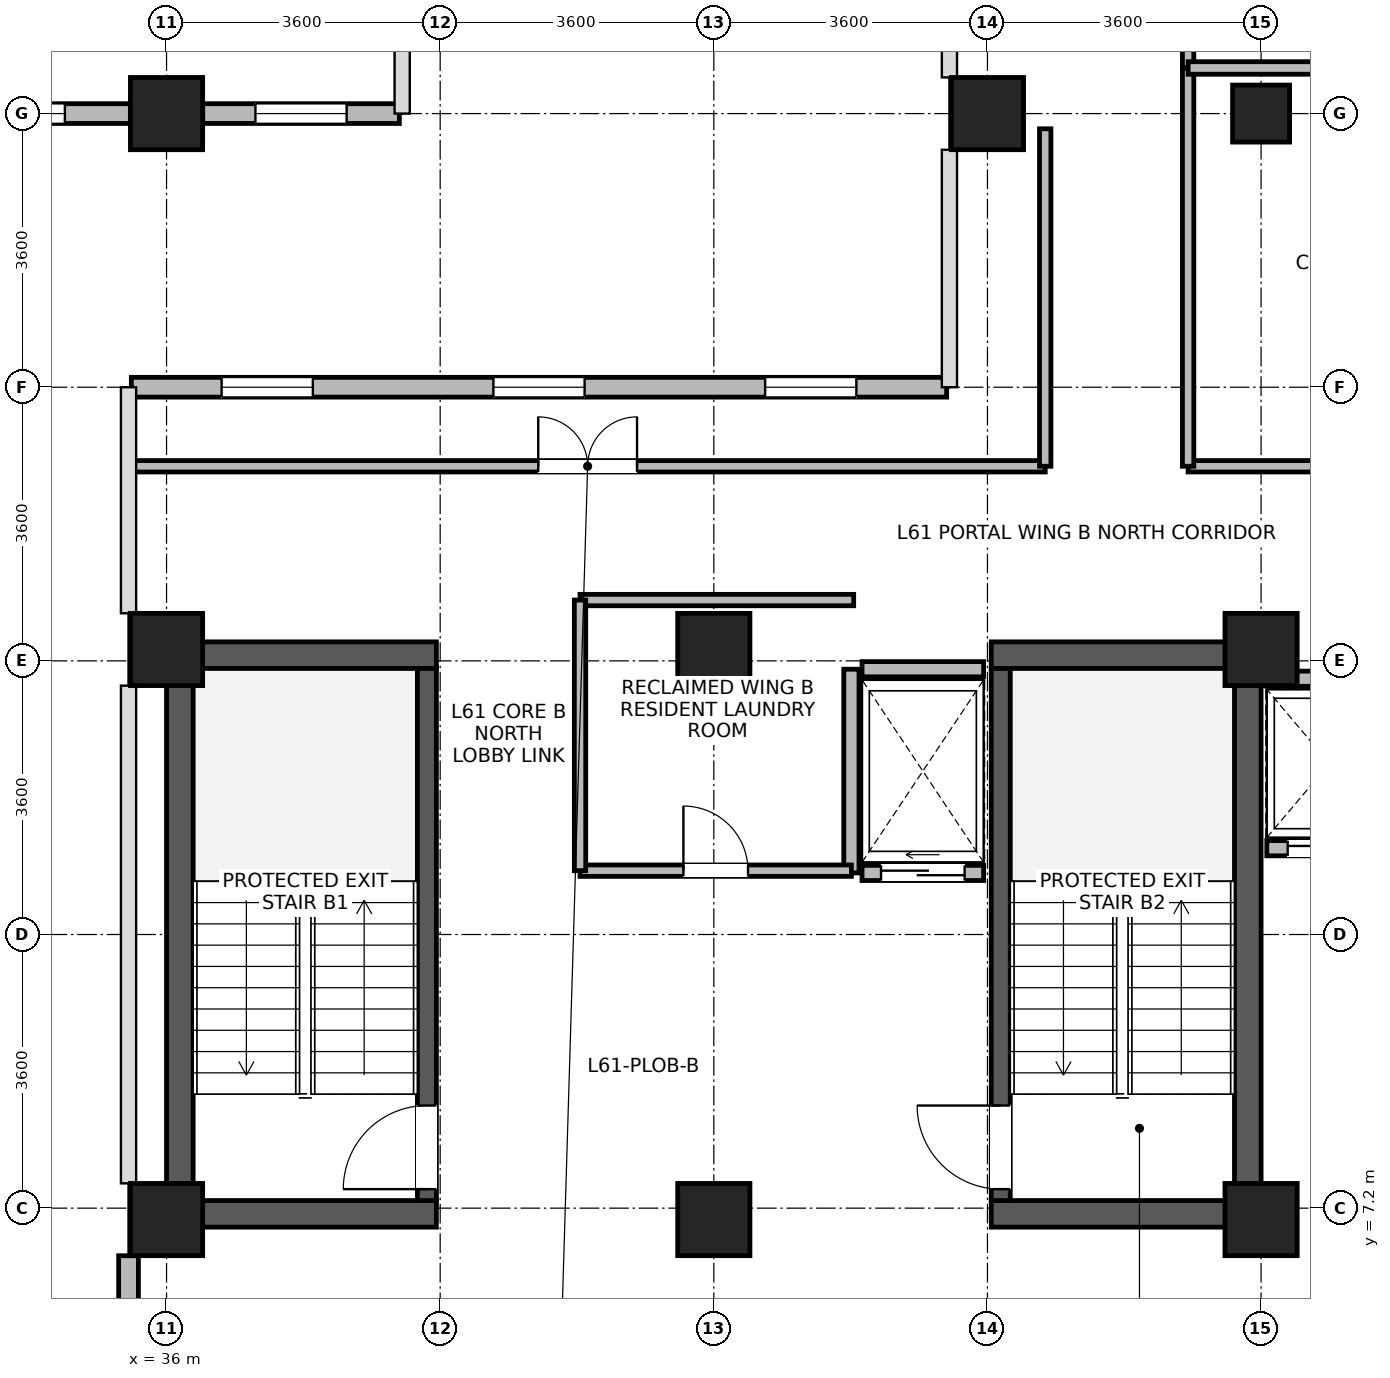
"""IFC4 building model, lengths in metres.
Left out: names, types, materials, properties, quantities, classifications, styles, units other than length and angle.
Written with IfcOpenShell. Run it as: python <this file> out.ifc"""

import sys

from ifc_helpers import new_model, si_unit, direction, frame, frame_2d, origin, origin_2d, place, context, subcontext, project, spatial, rectangle, extrude, source, transform, mapped, element, fill, save


model = new_model("IFC4")
c1 = context("Model", 3, precision=1e-05, world=origin(), true_north=direction((0.0, 1.0)))
c2 = subcontext(c1, "Body", "Model", "MODEL_VIEW")
j1 = project(units=[si_unit("LENGTHUNIT", "METRE"), si_unit("PLANEANGLEUNIT", "RADIAN")], contexts=[c1])
p1 = place(None, origin())
s1 = spatial("IfcSite", under=j1, at=p1, CompositionType="ELEMENT")
p2 = place(p1, origin())
s2 = spatial("IfcBuilding", under=s1, at=p2, CompositionType="ELEMENT")
p3 = place(p2, frame((0.0, 0.0, 238.8)))
s3 = spatial("IfcBuildingStorey", under=s2, at=p3, CompositionType="ELEMENT", Elevation=238.8)
for number, where, z_axis, x_axis in (
    (1, (36.175, 6.95, 0.0), (0.0, 0.0, 1.0), (0.0, 1.0, 0.0)),
    (2, (50.225, 6.95, 0.0), (0.0, 0.0, 1.0), (0.0, 1.0, 0.0)),
):
    element("IfcWall", number, at=place(p3, frame(where, z_axis=z_axis, x_axis=x_axis)), inside=s3, PredefinedType="SHEAR", context=c2, shape_type="SweptSolid", body=[
        extrude(rectangle(XDim=7.7, YDim=0.35, at=frame_2d((3.85, 0.0))), origin(), (0.0, 0.0, 1.0), 3.44),
    ])
for number, where, z_axis, x_axis in (
    (3, (36.35, 7.125, 0.0), (0.0, 0.0, 1.0), (1.0, 0.0, 0.0)),
    (4, (46.85, 7.125, 0.0), (0.0, 0.0, 1.0), (1.0, 0.0, 0.0)),
    (5, (36.35, 14.475, 0.0), (0.0, 0.0, 1.0), (1.0, 0.0, 0.0)),
    (6, (46.85, 14.475, 0.0), (0.0, 0.0, 1.0), (1.0, 0.0, 0.0)),
):
    element("IfcWall", number, at=place(p3, frame(where, z_axis=z_axis, x_axis=x_axis)), inside=s3, PredefinedType="SHEAR", context=c2, shape_type="SweptSolid", body=[
        extrude(rectangle(XDim=3.2, YDim=0.35, at=frame_2d((1.6, 0.0))), origin(), (0.0, 0.0, 1.0), 3.44),
    ])
p4 = place(p3, frame((39.425, 7.3, 0.0), z_axis=(0.0, 0.0, 1.0), x_axis=(0.0, 1.0, 0.0)))
e7 = element("IfcWall", 7, at=p4, inside=s3, PredefinedType="SHEAR", context=c2, shape_type="SweptSolid", body=[
    extrude(rectangle(XDim=7.0, YDim=0.25, at=frame_2d((3.5, 0.0))), origin(), (0.0, 0.0, 1.0), 3.44),
])
p5 = place(p4, frame((0.15, 0.0, 0.0)))
e8 = element("IfcOpeningElement", 8, at=p5, cuts=e7, PredefinedType="OPENING", context=c2, shape_type="SweptSolid", body=[
    extrude(rectangle(XDim=1.1, YDim=2.08, at=frame_2d((0.55, 1.04))), frame((0.0, 0.135, 0.0), z_axis=(0.0, -1.0, 0.0), x_axis=(1.0, 0.0, 0.0)), (0.0, 0.0, 1.0), 0.27),
])
p6 = place(p3, frame((46.975, 7.3, 0.0), z_axis=(0.0, 0.0, 1.0), x_axis=(0.0, 1.0, 0.0)))
e9 = element("IfcWall", 9, at=p6, inside=s3, PredefinedType="SHEAR", context=c2, shape_type="SweptSolid", body=[
    extrude(rectangle(XDim=7.0, YDim=0.25, at=frame_2d((3.5, 0.0))), origin(), (0.0, 0.0, 1.0), 3.44),
])
p7 = place(p6, frame((0.15, 0.0, 0.0)))
e10 = element("IfcOpeningElement", 10, at=p7, cuts=e9, PredefinedType="OPENING", context=c2, shape_type="SweptSolid", body=[
    extrude(rectangle(XDim=1.1, YDim=2.08, at=frame_2d((0.55, 1.04))), frame((0.0, 0.135, 0.0), z_axis=(0.0, -1.0, 0.0), x_axis=(1.0, 0.0, 0.0)), (0.0, 0.0, 1.0), 0.27),
])
m1 = source(origin(), c2, "Body", "SweptSolid", [
    extrude(rectangle(XDim=0.95, YDim=0.95, at=origin_2d()), origin(), (0.0, 0.0, 1.0), 3.7),
])
for number, where, z_axis, x_axis in (
    (11, (36.0, 21.6, 0.0), (0.0, 0.0, 1.0), (1.0, 0.0, 0.0)),
    (12, (46.8, 21.6, 0.0), (0.0, 0.0, 1.0), (1.0, 0.0, 0.0)),
    (13, (36.0, 7.05, 0.0), (0.0, 0.0, 1.0), (1.0, 0.0, 0.0)),
    (14, (36.0, 14.55, 0.0), (0.0, 0.0, 1.0), (1.0, 0.0, 0.0)),
    (15, (43.2, 7.05, 0.0), (0.0, 0.0, 1.0), (1.0, 0.0, 0.0)),
    (16, (43.2, 14.55, 0.0), (0.0, 0.0, 1.0), (1.0, 0.0, 0.0)),
    (17, (50.4, 7.05, 0.0), (0.0, 0.0, 1.0), (1.0, 0.0, 0.0)),
    (18, (50.4, 14.55, 0.0), (0.0, 0.0, 1.0), (1.0, 0.0, 0.0)),
):
    element("IfcColumn", number, at=place(p3, frame(where, z_axis=z_axis, x_axis=x_axis)), inside=s3, PredefinedType="COLUMN", context=c2, shape_type="MappedRepresentation", body=[
        mapped(m1, transform((0.0, 0.0, 0.0), x_axis=(1.0, 0.0, 0.0), y_axis=(0.0, 1.0, 0.0), z_axis=(0.0, 0.0, 1.0), scale=1.0)),
    ])
m2 = source(origin(), c2, "Body", "SweptSolid", [
    extrude(rectangle(XDim=0.75, YDim=0.75, at=origin_2d()), origin(), (0.0, 0.0, 1.0), 3.7),
])
p8 = place(p3, frame((50.4, 21.6, 0.0), z_axis=(0.0, 0.0, 1.0), x_axis=(1.0, 0.0, 0.0)))
e19 = element("IfcColumn", 19, at=p8, inside=s3, PredefinedType="PILASTER", context=c2, shape_type="MappedRepresentation", body=[
    mapped(m2, transform((0.0, 0.0, 0.0), x_axis=(1.0, 0.0, 0.0), y_axis=(0.0, 1.0, 0.0), z_axis=(0.0, 0.0, 1.0), scale=1.0)),
])
p9 = place(p3, frame((35.524, 21.6, 0.0), z_axis=(0.0, 0.0, 1.0), x_axis=(-1.0, 0.0, 0.0)))
e20 = element("IfcWall", 20, at=p9, inside=s3, PredefinedType="STANDARD", context=c2, shape_type="SweptSolid", body=[
    extrude(rectangle(XDim=2.923, YDim=0.26, at=frame_2d((1.462, 0.0))), origin(), (0.0, 0.0, 1.0), 3.02),
])
p10 = place(p9, frame((0.862, 0.0, 0.85)))
e21 = element("IfcOpeningElement", 21, at=p10, cuts=e20, PredefinedType="OPENING", context=c2, shape_type="SweptSolid", body=[
    extrude(rectangle(XDim=1.2, YDim=1.75, at=frame_2d((0.6, 0.875))), frame((0.0, 0.14, 0.0), z_axis=(0.0, -1.0, 0.0), x_axis=(1.0, 0.0, 0.0)), (0.0, 0.0, 1.0), 0.28),
])
p11 = place(p3, frame((39.063, 21.6, 0.0), z_axis=(0.0, 0.0, 1.0), x_axis=(-1.0, 0.0, 0.0)))
e22 = element("IfcWall", 22, at=p11, inside=s3, PredefinedType="STANDARD", context=c2, shape_type="SweptSolid", body=[
    extrude(rectangle(XDim=2.587, YDim=0.26, at=frame_2d((1.293, 0.0))), origin(), (0.0, 0.0, 1.0), 3.42),
])
p12 = place(p11, frame((0.694, 0.0, 0.85)))
e23 = element("IfcOpeningElement", 23, at=p12, cuts=e22, PredefinedType="OPENING", context=c2, shape_type="SweptSolid", body=[
    extrude(rectangle(XDim=1.2, YDim=1.75, at=frame_2d((0.6, 0.875))), frame((0.0, 0.14, 0.0), z_axis=(0.0, -1.0, 0.0), x_axis=(1.0, 0.0, 0.0)), (0.0, 0.0, 1.0), 0.28),
])
p13 = place(p3, frame((35.537, 18.0, 0.0), z_axis=(0.0, 0.0, 1.0), x_axis=(1.0, 0.0, 0.0)))
e24 = element("IfcWall", 24, at=p13, inside=s3, PredefinedType="STANDARD", context=c2, shape_type="SweptSolid", body=[
    extrude(rectangle(XDim=10.726, YDim=0.26, at=frame_2d((5.363, 0.0))), origin(), (0.0, 0.0, 1.0), 3.42),
])
p14 = place(p13, frame((1.188, 0.0, 0.85)))
e25 = element("IfcOpeningElement", 25, at=p14, cuts=e24, PredefinedType="OPENING", context=c2, shape_type="SweptSolid", body=[
    extrude(rectangle(XDim=1.2, YDim=1.75, at=frame_2d((0.6, 0.875))), frame((0.0, 0.14, 0.0), z_axis=(0.0, -1.0, 0.0), x_axis=(1.0, 0.0, 0.0)), (0.0, 0.0, 1.0), 0.28),
])
p15 = place(p13, frame((4.763, 0.0, 0.85)))
e26 = element("IfcOpeningElement", 26, at=p15, cuts=e24, PredefinedType="OPENING", context=c2, shape_type="SweptSolid", body=[
    extrude(rectangle(XDim=1.2, YDim=1.75, at=frame_2d((0.6, 0.875))), frame((0.0, 0.14, 0.0), z_axis=(0.0, -1.0, 0.0), x_axis=(1.0, 0.0, 0.0)), (0.0, 0.0, 1.0), 0.28),
])
p16 = place(p13, frame((8.338, 0.0, 0.85)))
e27 = element("IfcOpeningElement", 27, at=p16, cuts=e24, PredefinedType="OPENING", context=c2, shape_type="SweptSolid", body=[
    extrude(rectangle(XDim=1.2, YDim=1.75, at=frame_2d((0.6, 0.875))), frame((0.0, 0.14, 0.0), z_axis=(0.0, -1.0, 0.0), x_axis=(1.0, 0.0, 0.0)), (0.0, 0.0, 1.0), 0.28),
])
p17 = place(p3, frame((35.5, 5.8, 0.0), z_axis=(0.0, 0.0, 1.0), x_axis=(0.0, 1.0, 0.0)))
e28 = element("IfcWall", 28, at=p17, inside=s3, PredefinedType="STANDARD", context=c2, shape_type="SweptSolid", body=[
    extrude(rectangle(XDim=0.774, YDim=0.26, at=frame_2d((0.387, 0.0))), origin(), (0.0, 0.0, 1.0), 3.44),
])
p18 = place(p3, frame((50.475, 11.935, 0.0), z_axis=(0.0, 0.0, 1.0), x_axis=(1.0, 0.0, 0.0)))
e29 = element("IfcWall", 29, at=p18, inside=s3, PredefinedType="PARTITIONING", context=c2, shape_type="SweptSolid", body=[
    extrude(rectangle(XDim=1.65, YDim=0.2, at=frame_2d((0.825, 0.0))), origin(), (0.0, 0.0, 1.0), 3.42),
])
p19 = place(p18, frame((0.275, 0.0, 0.0)))
e30 = element("IfcOpeningElement", 30, at=p19, cuts=e29, PredefinedType="OPENING", context=c2, shape_type="SweptSolid", body=[
    extrude(rectangle(XDim=1.1, YDim=2.12, at=frame_2d((0.55, 1.06))), frame((0.0, 0.11, 0.0), z_axis=(0.0, -1.0, 0.0), x_axis=(1.0, 0.0, 0.0)), (0.0, 0.0, 1.0), 0.22),
])
p20 = place(p3, frame((50.475, 14.165, 0.0), z_axis=(0.0, 0.0, 1.0), x_axis=(1.0, 0.0, 0.0)))
e31 = element("IfcWall", 31, at=p20, inside=s3, PredefinedType="PARTITIONING", context=c2, shape_type="SweptSolid", body=[
    extrude(rectangle(XDim=1.65, YDim=0.2, at=frame_2d((0.825, 0.0))), origin(), (0.0, 0.0, 1.0), 3.42),
])
p21 = place(p3, frame((45.15, 11.61, 0.0), z_axis=(0.0, 0.0, 1.0), x_axis=(1.0, 0.0, 0.0)))
e32 = element("IfcWall", 32, at=p21, inside=s3, PredefinedType="PARTITIONING", context=c2, shape_type="SweptSolid", body=[
    extrude(rectangle(XDim=1.6, YDim=0.2, at=frame_2d((0.8, 0.0))), origin(), (0.0, 0.0, 1.0), 3.42),
])
p22 = place(p21, frame((0.25, 0.0, 0.0)))
e33 = element("IfcOpeningElement", 33, at=p22, cuts=e32, PredefinedType="OPENING", context=c2, shape_type="SweptSolid", body=[
    extrude(rectangle(XDim=1.1, YDim=2.12, at=frame_2d((0.55, 1.06))), frame((0.0, 0.11, 0.0), z_axis=(0.0, -1.0, 0.0), x_axis=(1.0, 0.0, 0.0)), (0.0, 0.0, 1.0), 0.22),
])
p23 = place(p3, frame((45.15, 14.29, 0.0), z_axis=(0.0, 0.0, 1.0), x_axis=(1.0, 0.0, 0.0)))
e34 = element("IfcWall", 34, at=p23, inside=s3, PredefinedType="PARTITIONING", context=c2, shape_type="SweptSolid", body=[
    extrude(rectangle(XDim=1.6, YDim=0.2, at=frame_2d((0.8, 0.0))), origin(), (0.0, 0.0, 1.0), 2.52),
])
p24 = place(p3, frame((45.01, 11.61, 0.0), z_axis=(0.0, 0.0, 1.0), x_axis=(0.0, 1.0, 0.0)))
e35 = element("IfcWall", 35, at=p24, inside=s3, PredefinedType="PARTITIONING", context=c2, shape_type="SweptSolid", body=[
    extrude(rectangle(XDim=2.68, YDim=0.2, at=frame_2d((1.34, 0.0))), origin(), (0.0, 0.0, 1.0), 3.42),
])
p25 = place(p3, frame((35.52, 16.96, 0.0), z_axis=(0.0, 0.0, 1.0), x_axis=(1.0, 0.0, 0.0)))
e36 = element("IfcWall", 36, at=p25, inside=s3, PredefinedType="PARTITIONING", context=c2, shape_type="SweptSolid", body=[
    extrude(rectangle(XDim=12.04, YDim=0.15, at=frame_2d((6.02, 0.0))), origin(), (0.0, 0.0, 1.0), 3.42),
])
p26 = place(p25, frame((5.37, 0.0, 0.0)))
e37 = element("IfcOpeningElement", 37, at=p26, cuts=e36, PredefinedType="OPENING", context=c2, shape_type="SweptSolid", body=[
    extrude(rectangle(XDim=1.3, YDim=2.12, at=frame_2d((0.65, 1.06))), frame((0.0, 0.085, 0.0), z_axis=(0.0, -1.0, 0.0), x_axis=(1.0, 0.0, 0.0)), (0.0, 0.0, 1.0), 0.17),
])
p27 = place(p3, frame((49.44, 16.96, 0.0), z_axis=(0.0, 0.0, 1.0), x_axis=(1.0, 0.0, 0.0)))
e38 = element("IfcWall", 38, at=p27, inside=s3, PredefinedType="PARTITIONING", context=c2, shape_type="SweptSolid", body=[
    extrude(rectangle(XDim=11.128, YDim=0.15, at=frame_2d((5.564, 0.0))), origin(), (0.0, 0.0, 1.0), 3.42),
])
p28 = place(p27, frame((5.089, 0.0, 0.0)))
e39 = element("IfcOpeningElement", 39, at=p28, cuts=e38, PredefinedType="OPENING", context=c2, shape_type="SweptSolid", body=[
    extrude(rectangle(XDim=0.95, YDim=2.1, at=frame_2d((0.475, 1.05))), frame((0.0, 0.085, 0.0), z_axis=(0.0, -1.0, 0.0), x_axis=(1.0, 0.0, 0.0)), (0.0, 0.0, 1.0), 0.17),
])
p29 = place(p3, frame((49.44, 22.2, 0.0), z_axis=(0.0, 0.0, 1.0), x_axis=(0.0, 1.0, 0.0)))
e40 = element("IfcWall", 40, at=p29, inside=s3, PredefinedType="PARTITIONING", context=c2, shape_type="SweptSolid", body=[
    extrude(rectangle(XDim=5.24, YDim=0.15, at=frame_2d((2.62, 0.0))), origin(), (0.0, 0.0, 1.0), 3.42),
])
p30 = place(p29, frame((2.095, 0.0, 0.0)))
e41 = element("IfcOpeningElement", 41, at=p30, cuts=e40, PredefinedType="OPENING", context=c2, shape_type="SweptSolid", body=[
    extrude(rectangle(XDim=1.05, YDim=2.12, at=frame_2d((0.525, 1.06))), frame((0.0, 0.085, 0.0), z_axis=(0.0, -1.0, 0.0), x_axis=(1.0, 0.0, 0.0)), (0.0, 0.0, 1.0), 0.17),
])
p31 = place(p3, frame((49.44, 16.96, 0.0), z_axis=(0.0, 0.0, 1.0), x_axis=(0.0, 1.0, 0.0)))
e42 = element("IfcWall", 42, at=p31, inside=s3, PredefinedType="PARTITIONING", context=c2, shape_type="SweptSolid", body=[
    extrude(rectangle(XDim=5.24, YDim=0.15, at=frame_2d((2.62, 0.0))), origin(), (0.0, 0.0, 1.0), 3.42),
])
p32 = place(p3, frame((47.56, 16.96, 0.0), z_axis=(0.0, 0.0, 1.0), x_axis=(0.0, 1.0, 0.0)))
e43 = element("IfcWall", 43, at=p32, inside=s3, PredefinedType="PARTITIONING", context=c2, shape_type="SweptSolid", body=[
    extrude(rectangle(XDim=4.44, YDim=0.15, at=frame_2d((2.22, 0.0))), origin(), (0.0, 0.0, 1.0), 3.42),
])
p33 = place(p3, frame((41.44, 11.64, 0.0), z_axis=(0.0, 0.0, 1.0), x_axis=(1.0, 0.0, 0.0)))
e44 = element("IfcWall", 44, at=p33, inside=s3, PredefinedType="PARTITIONING", context=c2, shape_type="SweptSolid", body=[
    extrude(rectangle(XDim=3.57, YDim=0.15, at=frame_2d((1.785, 0.0))), origin(), (0.0, 0.0, 1.0), 3.42),
])
p34 = place(p33, frame((1.36, 0.0, 0.0)))
e45 = element("IfcOpeningElement", 45, at=p34, cuts=e44, PredefinedType="OPENING", context=c2, shape_type="SweptSolid", body=[
    extrude(rectangle(XDim=0.85, YDim=2.04, at=frame_2d((0.425, 1.02))), frame((0.0, 0.085, 0.0), z_axis=(0.0, -1.0, 0.0), x_axis=(1.0, 0.0, 0.0)), (0.0, 0.0, 1.0), 0.17),
])
p35 = place(p3, frame((41.44, 15.2, 0.0), z_axis=(0.0, 0.0, 1.0), x_axis=(1.0, 0.0, 0.0)))
e46 = element("IfcWall", 46, at=p35, inside=s3, PredefinedType="PARTITIONING", context=c2, shape_type="SweptSolid", body=[
    extrude(rectangle(XDim=3.6, YDim=0.15, at=frame_2d((1.8, 0.0))), origin(), (0.0, 0.0, 1.0), 3.42),
])
p36 = place(p3, frame((41.44, 11.64, 0.0), z_axis=(0.0, 0.0, 1.0), x_axis=(0.0, 1.0, 0.0)))
e47 = element("IfcWall", 47, at=p36, inside=s3, PredefinedType="PARTITIONING", context=c2, shape_type="SweptSolid", body=[
    extrude(rectangle(XDim=3.56, YDim=0.15, at=frame_2d((1.78, 0.0))), origin(), (0.0, 0.0, 1.0), 3.42),
])
p37 = place(p3, frame((49.44, 22.2, 0.0), z_axis=(0.0, 0.0, 1.0), x_axis=(1.0, 0.0, 0.0)))
e48 = element("IfcWall", 48, at=p37, inside=s3, PredefinedType="PARTITIONING", context=c2, shape_type="SweptSolid", body=[
    extrude(rectangle(XDim=11.128, YDim=0.165, at=frame_2d((5.564, 0.0))), origin(), (0.0, 0.0, 1.0), 3.42),
])
p38 = place(p10, origin())
e49 = element("IfcWindow", 49, at=p38, inside=s3, PartitioningType="SINGLE_PANEL", PredefinedType="WINDOW", context=c2, shape_type="SweptSolid", body=[
    extrude(rectangle(XDim=1.2, YDim=1.75, at=frame_2d((0.6, 0.875))), frame((0.0, 0.03, 0.0), z_axis=(0.0, -1.0, 0.0), x_axis=(1.0, 0.0, 0.0)), (0.0, 0.0, 1.0), 0.06),
])
fill(e21, e49)
p39 = place(p12, origin())
e50 = element("IfcWindow", 50, at=p39, inside=s3, PartitioningType="SINGLE_PANEL", PredefinedType="WINDOW", context=c2, shape_type="SweptSolid", body=[
    extrude(rectangle(XDim=1.2, YDim=1.75, at=frame_2d((0.6, 0.875))), frame((0.0, 0.03, 0.0), z_axis=(0.0, -1.0, 0.0), x_axis=(1.0, 0.0, 0.0)), (0.0, 0.0, 1.0), 0.06),
])
fill(e23, e50)
p40 = place(p14, origin())
e51 = element("IfcWindow", 51, at=p40, inside=s3, PartitioningType="SINGLE_PANEL", PredefinedType="WINDOW", context=c2, shape_type="SweptSolid", body=[
    extrude(rectangle(XDim=1.2, YDim=1.75, at=frame_2d((0.6, 0.875))), frame((0.0, 0.03, 0.0), z_axis=(0.0, -1.0, 0.0), x_axis=(1.0, 0.0, 0.0)), (0.0, 0.0, 1.0), 0.06),
])
fill(e25, e51)
p41 = place(p15, origin())
e52 = element("IfcWindow", 52, at=p41, inside=s3, PartitioningType="SINGLE_PANEL", PredefinedType="WINDOW", context=c2, shape_type="SweptSolid", body=[
    extrude(rectangle(XDim=1.2, YDim=1.75, at=frame_2d((0.6, 0.875))), frame((0.0, 0.03, 0.0), z_axis=(0.0, -1.0, 0.0), x_axis=(1.0, 0.0, 0.0)), (0.0, 0.0, 1.0), 0.06),
])
fill(e26, e52)
p42 = place(p16, origin())
e53 = element("IfcWindow", 53, at=p42, inside=s3, PartitioningType="SINGLE_PANEL", PredefinedType="WINDOW", context=c2, shape_type="SweptSolid", body=[
    extrude(rectangle(XDim=1.2, YDim=1.75, at=frame_2d((0.6, 0.875))), frame((0.0, 0.03, 0.0), z_axis=(0.0, -1.0, 0.0), x_axis=(1.0, 0.0, 0.0)), (0.0, 0.0, 1.0), 0.06),
])
fill(e27, e53)
p43 = place(p5, origin())
e54 = element("IfcDoor", 54, at=p43, inside=s3, OperationType="SINGLE_SWING_LEFT", PredefinedType="DOOR", context=c2, shape_type="SweptSolid", body=[
    extrude(rectangle(XDim=1.1, YDim=2.08, at=frame_2d((0.55, 1.04))), frame((0.0, 0.025, 0.0), z_axis=(0.0, -1.0, 0.0), x_axis=(1.0, 0.0, 0.0)), (0.0, 0.0, 1.0), 0.05),
])
fill(e8, e54)
p44 = place(p7, origin())
e55 = element("IfcDoor", 55, at=p44, inside=s3, OperationType="SINGLE_SWING_RIGHT", PredefinedType="DOOR", context=c2, shape_type="SweptSolid", body=[
    extrude(rectangle(XDim=1.1, YDim=2.08, at=frame_2d((0.55, 1.04))), frame((0.0, 0.025, 0.0), z_axis=(0.0, -1.0, 0.0), x_axis=(1.0, 0.0, 0.0)), (0.0, 0.0, 1.0), 0.05),
])
fill(e10, e55)
p45 = place(p19, origin())
e56 = element("IfcDoor", 56, at=p45, inside=s3, OperationType="SLIDING_TO_LEFT", PredefinedType="DOOR", context=c2, shape_type="SweptSolid", body=[
    extrude(rectangle(XDim=1.1, YDim=2.12, at=frame_2d((0.55, 1.06))), frame((0.0, 0.025, 0.0), z_axis=(0.0, -1.0, 0.0), x_axis=(1.0, 0.0, 0.0)), (0.0, 0.0, 1.0), 0.05),
])
fill(e30, e56)
p46 = place(p22, origin())
e57 = element("IfcDoor", 57, at=p46, inside=s3, OperationType="SLIDING_TO_LEFT", PredefinedType="DOOR", context=c2, shape_type="SweptSolid", body=[
    extrude(rectangle(XDim=1.1, YDim=2.12, at=frame_2d((0.55, 1.06))), frame((0.0, 0.025, 0.0), z_axis=(0.0, -1.0, 0.0), x_axis=(1.0, 0.0, 0.0)), (0.0, 0.0, 1.0), 0.05),
])
fill(e33, e57)
p47 = place(p26, origin())
e58 = element("IfcDoor", 58, at=p47, inside=s3, OperationType="DOUBLE_DOOR_SINGLE_SWING", PredefinedType="DOOR", context=c2, shape_type="SweptSolid", body=[
    extrude(rectangle(XDim=1.3, YDim=2.12, at=frame_2d((0.65, 1.06))), frame((0.0, 0.025, 0.0), z_axis=(0.0, -1.0, 0.0), x_axis=(1.0, 0.0, 0.0)), (0.0, 0.0, 1.0), 0.05),
])
fill(e37, e58)
p48 = place(p34, origin())
e59 = element("IfcDoor", 59, at=p48, inside=s3, OperationType="SINGLE_SWING_LEFT", PredefinedType="DOOR", context=c2, shape_type="SweptSolid", body=[
    extrude(rectangle(XDim=0.85, YDim=2.04, at=frame_2d((0.425, 1.02))), frame((0.0, 0.025, 0.0), z_axis=(0.0, -1.0, 0.0), x_axis=(1.0, 0.0, 0.0)), (0.0, 0.0, 1.0), 0.05),
])
fill(e45, e59)
save(model, sys.argv[1])
